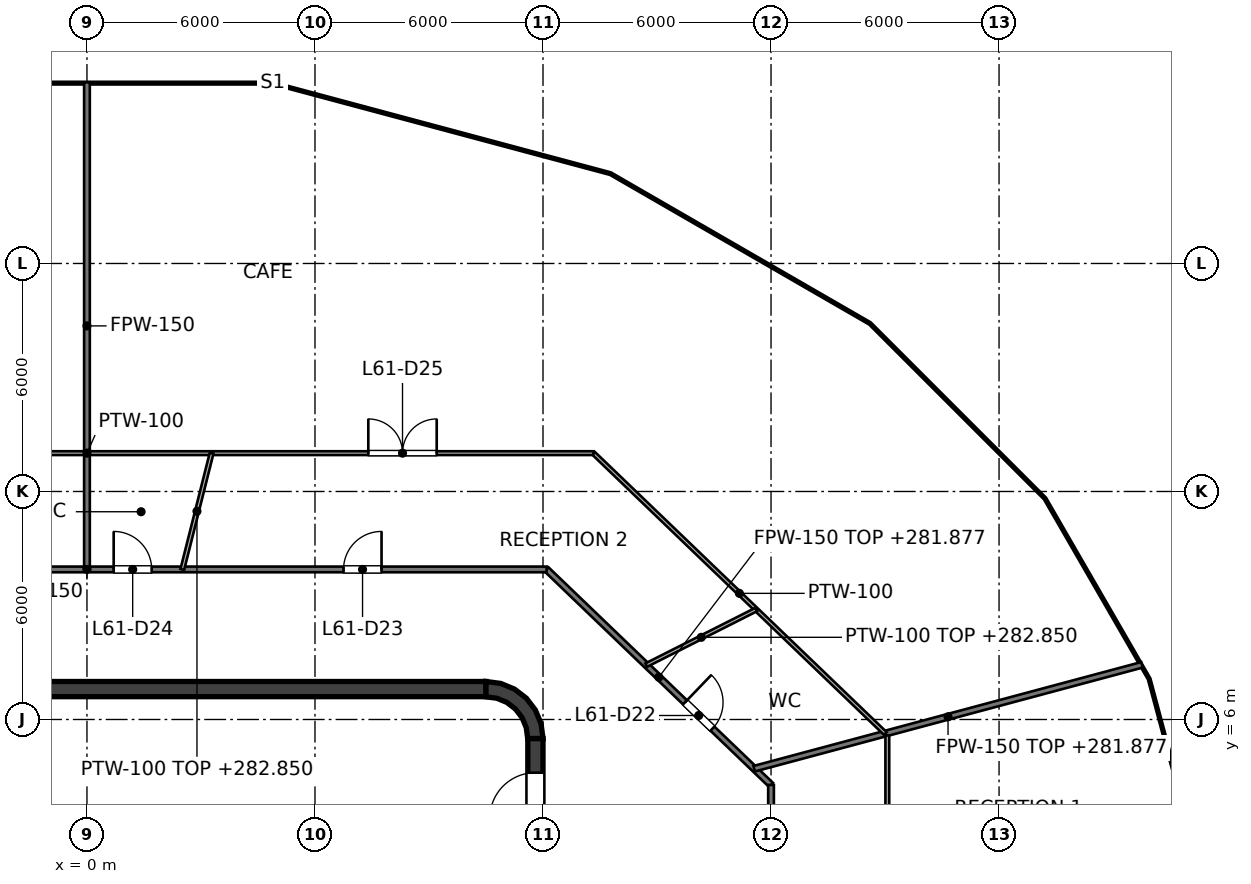
"""IFC4 building model, lengths in metres.
Left out: names, types, materials, properties, quantities, classifications, styles, units other than length and angle.
Written with IfcOpenShell. Run it as: python <this file> out.ifc"""

import sys

from ifc_helpers import new_model, si_unit, direction, frame, frame_2d, origin, place, context, subcontext, project, spatial, polyline, rectangle, outline, extrude, element, fill, save


model = new_model("IFC4")
c1 = context("Model", 3, precision=1e-05, world=origin(), true_north=direction((0.0, 1.0)))
c2 = subcontext(c1, "Body", "Model", "MODEL_VIEW")
j1 = project(units=[si_unit("LENGTHUNIT", "METRE"), si_unit("PLANEANGLEUNIT", "RADIAN")], contexts=[c1])
p1 = place(None, origin())
s1 = spatial("IfcSite", under=j1, at=p1, CompositionType="ELEMENT")
p2 = place(p1, origin())
s2 = spatial("IfcBuilding", under=s1, at=p2, CompositionType="ELEMENT")
p3 = place(p2, frame((0.0, 0.0, 279.0)))
s3 = spatial("IfcBuildingStorey", under=s2, at=p3, CompositionType="ELEMENT", Elevation=279.0)
p4 = place(p3, frame((-10.5, 6.8, 0.0), z_axis=(0.0, 0.0, 1.0), x_axis=(1.0, 0.0, 0.0)))
e1 = element("IfcWall", 1, at=p4, inside=s3, PredefinedType="SHEAR", context=c2, shape_type="SweptSolid", body=[
    extrude(rectangle(XDim=21.0, YDim=0.4, at=frame_2d((10.5, 0.0))), origin(), (0.0, 0.0, 1.0), 4.0),
])
p5 = place(p3, frame((11.8, -5.5, 0.0), z_axis=(0.0, 0.0, 1.0), x_axis=(0.0, 1.0, 0.0)))
e2 = element("IfcWall", 2, at=p5, inside=s3, PredefinedType="SHEAR", context=c2, shape_type="SweptSolid", body=[
    extrude(rectangle(XDim=11.0, YDim=0.4, at=frame_2d((5.5, 0.0))), origin(), (0.0, 0.0, 1.0), 4.0),
])
p6 = place(p5, frame((3.3, 0.0, 0.0)))
e3 = element("IfcOpeningElement", 3, at=p6, cuts=e2, PredefinedType="OPENING", context=c2, shape_type="SweptSolid", body=[
    extrude(rectangle(XDim=1.0, YDim=2.1, at=frame_2d((0.5, 1.05))), frame((0.0, 0.2, 0.0), z_axis=(0.0, -1.0, 0.0), x_axis=(1.0, 0.0, 0.0)), (0.0, 0.0, 1.0), 0.4),
])
p7 = place(p5, frame((6.2, 0.0, 0.0)))
e4 = element("IfcOpeningElement", 4, at=p7, cuts=e2, PredefinedType="OPENING", context=c2, shape_type="SweptSolid", body=[
    extrude(rectangle(XDim=1.0, YDim=2.1, at=frame_2d((0.5, 1.05))), frame((0.0, 0.2, 0.0), z_axis=(0.0, -1.0, 0.0), x_axis=(1.0, 0.0, 0.0)), (0.0, 0.0, 1.0), 0.4),
])
p8 = place(p5, frame((0.9, 0.0, 0.0)))
e5 = element("IfcOpeningElement", 5, at=p8, cuts=e2, PredefinedType="OPENING", context=c2, shape_type="SweptSolid", body=[
    extrude(rectangle(XDim=1.2, YDim=2.1, at=frame_2d((0.6, 1.05))), frame((0.0, 0.2, 0.0), z_axis=(0.0, -1.0, 0.0), x_axis=(1.0, 0.0, 0.0)), (0.0, 0.0, 1.0), 0.4),
])
p9 = place(p5, frame((8.9, 0.0, 0.0)))
e6 = element("IfcOpeningElement", 6, at=p9, cuts=e2, PredefinedType="OPENING", context=c2, shape_type="SweptSolid", body=[
    extrude(rectangle(XDim=1.2, YDim=2.1, at=frame_2d((0.6, 1.05))), frame((0.0, 0.2, 0.0), z_axis=(0.0, -1.0, 0.0), x_axis=(1.0, 0.0, 0.0)), (0.0, 0.0, 1.0), 0.4),
])
p10 = place(p3, origin())
e7 = element("IfcWall", 7, at=p10, inside=s3, PredefinedType="SHEAR", context=c2, shape_type="SweptSolid", body=[
    extrude(outline(polyline([(10.5, 7.0), (10.5, 6.596), (10.784, 6.559), (11.048, 6.45), (11.275, 6.275), (11.45, 6.048), (11.559, 5.784), (11.596, 5.5), (12.0, 5.5), (11.949, 5.888), (11.799, 6.25), (11.561, 6.561), (11.25, 6.799), (10.888, 6.949), (10.5, 7.0)])), origin(), (0.0, 0.0, 1.0), 4.0),
])
p11 = place(p3, frame((9.0, 4.1, 0.0), z_axis=(0.0, 0.0, 1.0), x_axis=(0.0, 1.0, 0.0)))
e8 = element("IfcWall", 8, at=p11, inside=s3, PredefinedType="SOLIDWALL", context=c2, shape_type="SweptSolid", body=[
    extrude(rectangle(XDim=2.5, YDim=0.25, at=frame_2d((1.25, 0.0))), origin(), (0.0, 0.0, 1.0), 3.85),
])
p12 = place(p11, frame((0.65, 0.0, 0.0)))
e9 = element("IfcOpeningElement", 9, at=p12, cuts=e8, PredefinedType="OPENING", context=c2, shape_type="SweptSolid", body=[
    extrude(rectangle(XDim=1.2, YDim=2.1, at=frame_2d((0.6, 1.05))), frame((0.0, 0.125, 0.0), z_axis=(0.0, -1.0, 0.0), x_axis=(1.0, 0.0, 0.0)), (0.0, 0.0, 1.0), 0.25),
])
p13 = place(p3, frame((3.15, 4.1, 0.0), z_axis=(0.0, 0.0, 1.0), x_axis=(0.0, 1.0, 0.0)))
e10 = element("IfcWall", 10, at=p13, inside=s3, PredefinedType="SOLIDWALL", context=c2, shape_type="SweptSolid", body=[
    extrude(rectangle(XDim=2.5, YDim=0.25, at=frame_2d((1.25, 0.0))), origin(), (0.0, 0.0, 1.0), 3.85),
])
p14 = place(p3, frame((-0.775, 3.975, 0.0), z_axis=(0.0, 0.0, 1.0), x_axis=(1.0, 0.0, 0.0)))
e11 = element("IfcWall", 11, at=p14, inside=s3, PredefinedType="PARTITIONING", context=c2, shape_type="SweptSolid", body=[
    extrude(rectangle(XDim=1.55, YDim=0.25, at=frame_2d((0.775, 0.0))), origin(), (0.0, 0.0, 1.0), 3.85),
])
p15 = place(p14, frame((0.325, 0.0, 0.0)))
e12 = element("IfcOpeningElement", 12, at=p15, cuts=e11, PredefinedType="OPENING", context=c2, shape_type="SweptSolid", body=[
    extrude(rectangle(XDim=0.9, YDim=2.1, at=frame_2d((0.45, 1.05))), frame((0.0, 0.125, 0.0), z_axis=(0.0, -1.0, 0.0), x_axis=(1.0, 0.0, 0.0)), (0.0, 0.0, 1.0), 0.25),
])
for number, where, z_axis, x_axis in (
    (13, (-9.125, 3.975, 0.0), (0.0, 0.0, 1.0), (1.0, 0.0, 0.0)),
    (14, (0.775, 3.975, 0.0), (0.0, 0.0, 1.0), (1.0, 0.0, 0.0)),
):
    element("IfcWall", number, at=place(p3, frame(where, z_axis=z_axis, x_axis=x_axis)), inside=s3, PredefinedType="SOLIDWALL", context=c2, shape_type="SweptSolid", body=[
        extrude(rectangle(XDim=8.35, YDim=0.25, at=frame_2d((4.175, 0.0))), origin(), (0.0, 0.0, 1.0), 3.85),
    ])
for number, where, z_axis, x_axis in (
    (15, (9.0, 1.65, 0.0), (0.0, 0.0, 1.0), (0.0, 1.0, 0.0)),
    (16, (6.3, 1.65, 0.0), (0.0, 0.0, 1.0), (0.0, 1.0, 0.0)),
    (17, (3.6, 1.65, 0.0), (0.0, 0.0, 1.0), (0.0, 1.0, 0.0)),
    (18, (-0.9, 1.65, 0.0), (0.0, 0.0, 1.0), (0.0, 1.0, 0.0)),
    (19, (0.9, 1.65, 0.0), (0.0, 0.0, 1.0), (0.0, 1.0, 0.0)),
):
    element("IfcWall", number, at=place(p3, frame(where, z_axis=z_axis, x_axis=x_axis)), inside=s3, PredefinedType="SOLIDWALL", context=c2, shape_type="SweptSolid", body=[
        extrude(rectangle(XDim=2.2, YDim=0.25, at=frame_2d((1.1, 0.0))), origin(), (0.0, 0.0, 1.0), 3.85),
    ])
p16 = place(p3, frame((12.095, 9.949, 0.0), z_axis=(0.0, 0.0, 1.0), x_axis=(0.721348586031, -0.692572174889, 0.0)))
e20 = element("IfcWall", 20, at=p16, inside=s3, PredefinedType="PARTITIONING", context=c2, shape_type="SweptSolid", body=[
    extrude(rectangle(XDim=8.187, YDim=0.15, at=frame_2d((4.094, 0.0))), origin(), (0.0, 0.0, 1.0), 2.877),
])
p17 = place(p16, frame((5.05, 0.0, 0.0)))
e21 = element("IfcOpeningElement", 21, at=p17, cuts=e20, PredefinedType="OPENING", context=c2, shape_type="SweptSolid", body=[
    extrude(rectangle(XDim=1.0, YDim=2.1, at=frame_2d((0.5, 1.05))), frame((0.0, 0.075, 0.0), z_axis=(0.0, -1.0, 0.0), x_axis=(1.0, 0.0, 0.0)), (0.0, 0.0, 1.0), 0.15),
])
p18 = place(p3, frame((-12.095, 9.949, 0.0), z_axis=(0.0, 0.0, 1.0), x_axis=(1.0, 0.0, 0.0)))
e22 = element("IfcWall", 22, at=p18, inside=s3, PredefinedType="PARTITIONING", context=c2, shape_type="SweptSolid", body=[
    extrude(rectangle(XDim=24.19, YDim=0.15, at=frame_2d((12.095, 0.0))), origin(), (0.0, 0.0, 1.0), 2.927),
])
p19 = place(p18, frame((18.846, 0.0, 0.0)))
e23 = element("IfcOpeningElement", 23, at=p19, cuts=e22, PredefinedType="OPENING", context=c2, shape_type="SweptSolid", body=[
    extrude(rectangle(XDim=1.0, YDim=2.1, at=frame_2d((0.5, 1.05))), frame((0.0, 0.075, 0.0), z_axis=(0.0, -1.0, 0.0), x_axis=(1.0, 0.0, 0.0)), (0.0, 0.0, 1.0), 0.15),
])
p20 = place(p18, frame((12.798, 0.0, 0.0)))
e24 = element("IfcOpeningElement", 24, at=p20, cuts=e22, PredefinedType="OPENING", context=c2, shape_type="SweptSolid", body=[
    extrude(rectangle(XDim=1.0, YDim=2.1, at=frame_2d((0.5, 1.05))), frame((0.0, 0.075, 0.0), z_axis=(0.0, -1.0, 0.0), x_axis=(1.0, 0.0, 0.0)), (0.0, 0.0, 1.0), 0.15),
])
p21 = place(p18, frame((5.548, 0.0, 0.0)))
e25 = element("IfcOpeningElement", 25, at=p21, cuts=e22, PredefinedType="OPENING", context=c2, shape_type="SweptSolid", body=[
    extrude(rectangle(XDim=1.0, YDim=2.1, at=frame_2d((0.5, 1.05))), frame((0.0, 0.075, 0.0), z_axis=(0.0, -1.0, 0.0), x_axis=(1.0, 0.0, 0.0)), (0.0, 0.0, 1.0), 0.15),
])
p22 = place(p3, frame((17.556, 4.704, 0.0), z_axis=(0.0, 0.0, 1.0), x_axis=(0.96591926591, 0.258843527528, 0.0)))
e26 = element("IfcWall", 26, at=p22, inside=s3, PredefinedType="PARTITIONING", context=c2, shape_type="SweptSolid", body=[
    extrude(rectangle(XDim=10.563, YDim=0.15, at=frame_2d((5.281, 0.0))), origin(), (0.0, 0.0, 1.0), 2.877),
])
p23 = place(p3, frame((18.0, -4.278, 0.0), z_axis=(0.0, 0.0, 1.0), x_axis=(0.0, 1.0, 0.0)))
e27 = element("IfcWall", 27, at=p23, inside=s3, PredefinedType="PARTITIONING", context=c2, shape_type="SweptSolid", body=[
    extrude(rectangle(XDim=8.556, YDim=0.15, at=frame_2d((4.278, 0.0))), origin(), (0.0, 0.0, 1.0), 2.868),
])
p24 = place(p23, frame((1.017, 0.0, 0.0)))
e28 = element("IfcOpeningElement", 28, at=p24, cuts=e27, PredefinedType="OPENING", context=c2, shape_type="SweptSolid", body=[
    extrude(rectangle(XDim=1.0, YDim=2.1, at=frame_2d((0.5, 1.05))), frame((0.0, 0.075, 0.0), z_axis=(0.0, -1.0, 0.0), x_axis=(1.0, 0.0, 0.0)), (0.0, 0.0, 1.0), 0.15),
])
p25 = place(p23, frame((5.242, 0.0, 0.0)))
e29 = element("IfcOpeningElement", 29, at=p25, cuts=e27, PredefinedType="OPENING", context=c2, shape_type="SweptSolid", body=[
    extrude(rectangle(XDim=1.0, YDim=2.1, at=frame_2d((0.5, 1.05))), frame((0.0, 0.075, 0.0), z_axis=(0.0, -1.0, 0.0), x_axis=(1.0, 0.0, 0.0)), (0.0, 0.0, 1.0), 0.15),
])
p26 = place(p3, frame((0.0, 9.949, 0.0), z_axis=(0.0, 0.0, 1.0), x_axis=(0.0, 1.0, 0.0)))
e30 = element("IfcWall", 30, at=p26, inside=s3, PredefinedType="PARTITIONING", context=c2, shape_type="SweptSolid", body=[
    extrude(rectangle(XDim=12.817, YDim=0.15, at=frame_2d((6.409, 0.0))), origin(), (0.0, 0.0, 1.0), 2.927),
])
p27 = place(p3, frame((13.326, 13.009, 0.0), z_axis=(0.0, 0.0, 1.0), x_axis=(0.721273282207, -0.692650599057, 0.0)))
e31 = element("IfcWall", 31, at=p27, inside=s3, PredefinedType="PARTITIONING", context=c2, shape_type="SweptSolid", body=[
    extrude(rectangle(XDim=10.654, YDim=0.1, at=frame_2d((5.327, 0.0))), origin(), (0.0, 0.0, 1.0), 2.927),
])
p28 = place(p3, frame((-13.326, 13.009, 0.0), z_axis=(0.0, 0.0, 1.0), x_axis=(1.0, 0.0, 0.0)))
e32 = element("IfcWall", 32, at=p28, inside=s3, PredefinedType="PARTITIONING", context=c2, shape_type="SweptSolid", body=[
    extrude(rectangle(XDim=26.652, YDim=0.1, at=frame_2d((13.326, 0.0))), origin(), (0.0, 0.0, 1.0), 2.927),
])
p29 = place(p28, frame((20.729, 0.0, 0.0)))
e33 = element("IfcOpeningElement", 33, at=p29, cuts=e32, PredefinedType="OPENING", context=c2, shape_type="SweptSolid", body=[
    extrude(rectangle(XDim=1.8, YDim=2.1, at=frame_2d((0.9, 1.05))), frame((0.0, 0.05, 0.0), z_axis=(0.0, -1.0, 0.0), x_axis=(1.0, 0.0, 0.0)), (0.0, 0.0, 1.0), 0.1),
])
p30 = place(p28, frame((5.813, 0.0, 0.0)))
e34 = element("IfcOpeningElement", 34, at=p30, cuts=e32, PredefinedType="OPENING", context=c2, shape_type="SweptSolid", body=[
    extrude(rectangle(XDim=1.8, YDim=2.1, at=frame_2d((0.9, 1.05))), frame((0.0, 0.05, 0.0), z_axis=(0.0, -1.0, 0.0), x_axis=(1.0, 0.0, 0.0)), (0.0, 0.0, 1.0), 0.1),
])
p31 = place(p3, frame((14.717, 7.431, 0.0), z_axis=(0.0, 0.0, 1.0), x_axis=(0.892430828446, 0.4511842378, 0.0)))
e35 = element("IfcWall", 35, at=p31, inside=s3, PredefinedType="PARTITIONING", context=c2, shape_type="SweptSolid", body=[
    extrude(rectangle(XDim=3.243, YDim=0.1, at=frame_2d((1.622, 0.0))), origin(), (0.0, 0.0, 1.0), 3.85),
])
p32 = place(p3, frame((2.509, 9.949, 0.0), z_axis=(0.0, 0.0, 1.0), x_axis=(0.244319164476, 0.96969487256, 0.0)))
e36 = element("IfcWall", 36, at=p32, inside=s3, PredefinedType="PARTITIONING", context=c2, shape_type="SweptSolid", body=[
    extrude(rectangle(XDim=3.156, YDim=0.1, at=frame_2d((1.578, 0.0))), origin(), (0.0, 0.0, 1.0), 3.85),
])
p33 = place(p3, frame((21.06, -5.582, 0.0), z_axis=(0.0, 0.0, 1.0), x_axis=(0.0, 1.0, 0.0)))
e37 = element("IfcWall", 37, at=p33, inside=s3, PredefinedType="PARTITIONING", context=c2, shape_type="SweptSolid", body=[
    extrude(rectangle(XDim=11.164, YDim=0.1, at=frame_2d((5.582, 0.0))), origin(), (0.0, 0.0, 1.0), 2.868),
])
p34 = place(p33, frame((6.735, 0.0, 0.0)))
e38 = element("IfcOpeningElement", 38, at=p34, cuts=e37, PredefinedType="OPENING", context=c2, shape_type="SweptSolid", body=[
    extrude(rectangle(XDim=1.8, YDim=2.1, at=frame_2d((0.9, 1.05))), frame((0.0, 0.05, 0.0), z_axis=(0.0, -1.0, 0.0), x_axis=(1.0, 0.0, 0.0)), (0.0, 0.0, 1.0), 0.1),
])
p35 = place(p12, origin())
e39 = element("IfcDoor", 39, at=p35, inside=s3, OperationType="SINGLE_SWING_LEFT", PredefinedType="DOOR", context=c2, shape_type="SweptSolid", body=[
    extrude(rectangle(XDim=1.2, YDim=2.1, at=frame_2d((0.6, 1.05))), frame((0.0, 0.025, 0.0), z_axis=(0.0, -1.0, 0.0), x_axis=(1.0, 0.0, 0.0)), (0.0, 0.0, 1.0), 0.05),
])
fill(e9, e39)
p36 = place(p15, origin())
e40 = element("IfcDoor", 40, at=p36, inside=s3, OperationType="SINGLE_SWING_LEFT", PredefinedType="DOOR", context=c2, shape_type="SweptSolid", body=[
    extrude(rectangle(XDim=0.9, YDim=2.1, at=frame_2d((0.45, 1.05))), frame((0.0, 0.025, 0.0), z_axis=(0.0, -1.0, 0.0), x_axis=(1.0, 0.0, 0.0)), (0.0, 0.0, 1.0), 0.05),
])
fill(e12, e40)
p37 = place(p9, origin())
e41 = element("IfcDoor", 41, at=p37, inside=s3, OperationType="SINGLE_SWING_LEFT", PredefinedType="DOOR", context=c2, shape_type="SweptSolid", body=[
    extrude(rectangle(XDim=1.2, YDim=2.1, at=frame_2d((0.6, 1.05))), frame((0.0, 0.025, 0.0), z_axis=(0.0, -1.0, 0.0), x_axis=(1.0, 0.0, 0.0)), (0.0, 0.0, 1.0), 0.05),
])
fill(e6, e41)
p38 = place(p17, origin())
e42 = element("IfcDoor", 42, at=p38, inside=s3, OperationType="SINGLE_SWING_LEFT", PredefinedType="DOOR", context=c2, shape_type="SweptSolid", body=[
    extrude(rectangle(XDim=1.0, YDim=2.1, at=frame_2d((0.5, 1.05))), frame((0.0, 0.025, 0.0), z_axis=(0.0, -1.0, 0.0), x_axis=(1.0, 0.0, 0.0)), (0.0, 0.0, 1.0), 0.05),
])
fill(e21, e42)
p39 = place(p19, origin())
e43 = element("IfcDoor", 43, at=p39, inside=s3, OperationType="SINGLE_SWING_RIGHT", PredefinedType="DOOR", context=c2, shape_type="SweptSolid", body=[
    extrude(rectangle(XDim=1.0, YDim=2.1, at=frame_2d((0.5, 1.05))), frame((0.0, 0.025, 0.0), z_axis=(0.0, -1.0, 0.0), x_axis=(1.0, 0.0, 0.0)), (0.0, 0.0, 1.0), 0.05),
])
fill(e23, e43)
p40 = place(p20, origin())
e44 = element("IfcDoor", 44, at=p40, inside=s3, OperationType="SINGLE_SWING_LEFT", PredefinedType="DOOR", context=c2, shape_type="SweptSolid", body=[
    extrude(rectangle(XDim=1.0, YDim=2.1, at=frame_2d((0.5, 1.05))), frame((0.0, 0.025, 0.0), z_axis=(0.0, -1.0, 0.0), x_axis=(1.0, 0.0, 0.0)), (0.0, 0.0, 1.0), 0.05),
])
fill(e24, e44)
p41 = place(p29, origin())
e45 = element("IfcDoor", 45, at=p41, inside=s3, OperationType="DOUBLE_DOOR_SINGLE_SWING", PredefinedType="DOOR", context=c2, shape_type="SweptSolid", body=[
    extrude(rectangle(XDim=1.8, YDim=2.1, at=frame_2d((0.9, 1.05))), frame((0.0, 0.025, 0.0), z_axis=(0.0, -1.0, 0.0), x_axis=(1.0, 0.0, 0.0)), (0.0, 0.0, 1.0), 0.05),
])
fill(e33, e45)
save(model, sys.argv[1])
